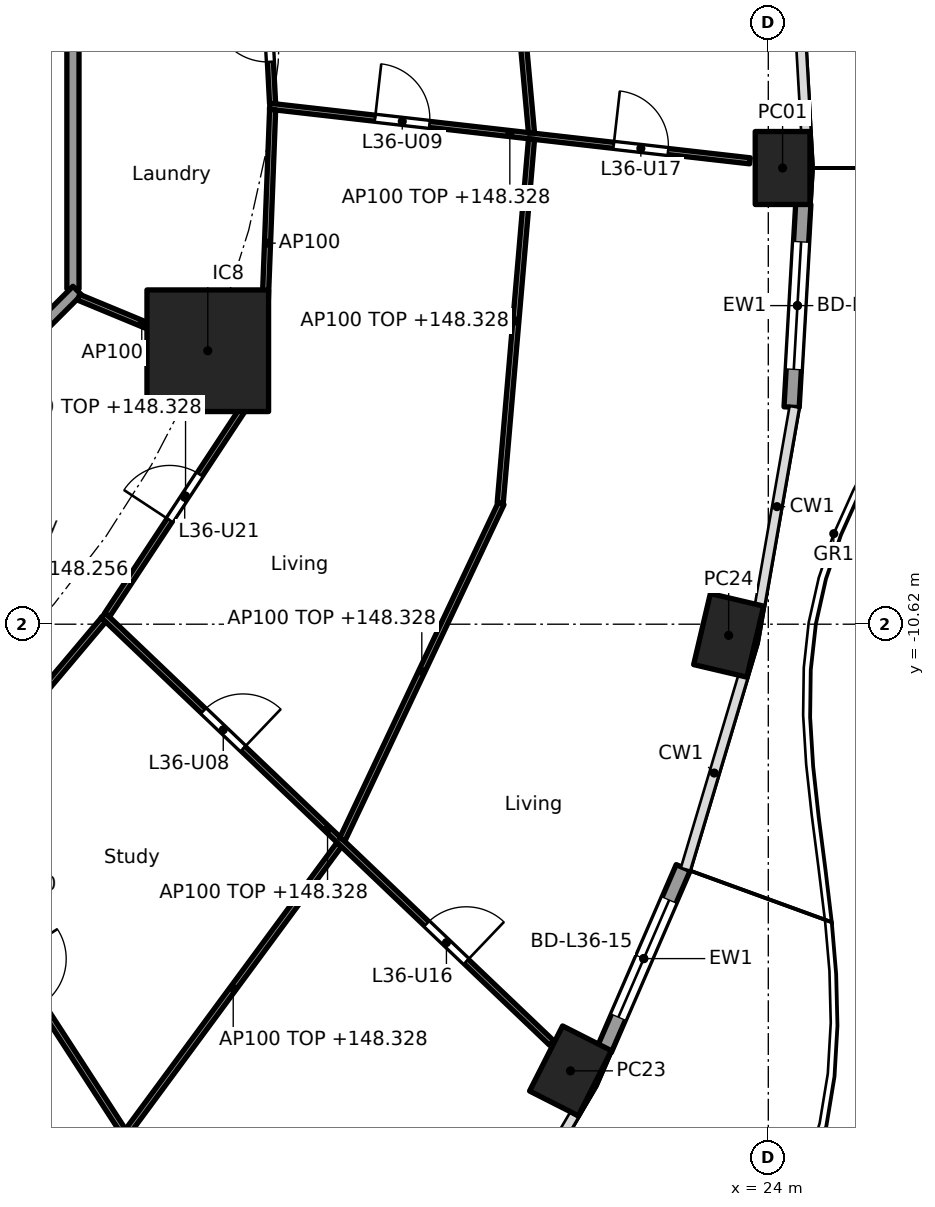
"""IFC4 building model, lengths in metres.
Left out: names, types, materials, properties, quantities, classifications, styles, units other than length and angle.
Written with IfcOpenShell. Run it as: python <this file> out.ifc"""

import sys

from ifc_helpers import new_model, si_unit, direction, frame, frame_2d, origin, origin_2d, place, context, subcontext, project, spatial, rectangle, hollow_rectangle, extrude, element, fill, save


model = new_model("IFC4")
c1 = context("Model", 3, precision=1e-05, world=origin(), true_north=direction((0.0, 1.0)))
c2 = subcontext(c1, "Body", "Model", "MODEL_VIEW")
j1 = project(units=[si_unit("LENGTHUNIT", "METRE"), si_unit("PLANEANGLEUNIT", "RADIAN")], contexts=[c1])
p1 = place(None, origin())
s1 = spatial("IfcSite", under=j1, at=p1, CompositionType="ELEMENT")
p2 = place(p1, origin())
s2 = spatial("IfcBuilding", under=s1, at=p2, CompositionType="ELEMENT")
p3 = place(p2, frame((0.0, 0.0, 145.5)))
s3 = spatial("IfcBuildingStorey", under=s2, at=p3, CompositionType="ELEMENT", Elevation=145.5)
for number, where, z_axis, x_axis in (
    (1, (24.235, -3.118, 0.0), (0.0, 0.0, 1.0), (0.0, 1.0, 0.0)),
    (2, (20.747, -17.965, 0.0), (0.0, 0.0, 1.0), (0.452, 0.892, 0.0)),
    (3, (23.348, -10.803, 0.0), (0.0, 0.0, 1.0), (0.229, 0.973, 0.0)),
):
    element("IfcColumn", number, at=place(p3, frame(where, z_axis=z_axis, x_axis=x_axis)), inside=s3, PredefinedType="COLUMN", context=c2, shape_type="SweptSolid", body=[
        extrude(hollow_rectangle(XDim=1.2, YDim=0.9, WallThickness=0.04, at=origin_2d()), origin(), (0.0, 0.0, 1.0), 3.7),
    ])
p4 = place(p3, frame((14.782, -6.123, 0.0), z_axis=(0.0, 0.0, 1.0), x_axis=(1.0, 0.0, 0.0)))
e4 = element("IfcColumn", 4, at=p4, inside=s3, PredefinedType="COLUMN", context=c2, shape_type="SweptSolid", body=[
    extrude(rectangle(XDim=2.0, YDim=2.0, at=origin_2d()), origin(), (0.0, 0.0, 1.0), 3.7),
])
p5 = place(p3, frame((22.6, -14.623, 0.0), z_axis=(0.0, 0.0, 1.0), x_axis=(-0.397575919276, -0.917569282622, 0.0)))
e5 = element("IfcWall", 5, at=p5, inside=s3, PredefinedType="SOLIDWALL", context=c2, shape_type="SweptSolid", body=[
    extrude(rectangle(XDim=3.261, YDim=0.25, at=frame_2d((1.63, 0.0))), origin(), (0.0, 0.0, 1.0), 3.44),
])
p6 = place(p5, frame((0.58, 0.0, 0.0)))
e6 = element("IfcOpeningElement", 6, at=p6, cuts=e5, PredefinedType="OPENING", context=c2, shape_type="SweptSolid", body=[
    extrude(rectangle(XDim=2.1, YDim=2.4, at=frame_2d((1.05, 1.2))), frame((0.0, 0.135, 0.0), z_axis=(0.0, -1.0, 0.0), x_axis=(1.0, 0.0, 0.0)), (0.0, 0.0, 1.0), 0.27),
])
p7 = place(p3, frame((24.576, -3.709, 0.0), z_axis=(0.0, 0.0, 1.0), x_axis=(-0.05746514539, -0.998347513176, 0.0)))
e7 = element("IfcWall", 7, at=p7, inside=s3, PredefinedType="SOLIDWALL", context=c2, shape_type="SweptSolid", body=[
    extrude(rectangle(XDim=3.348, YDim=0.25, at=frame_2d((1.674, 0.0))), origin(), (0.0, 0.0, 1.0), 3.44),
])
p8 = place(p7, frame((0.624, 0.0, 0.0)))
e8 = element("IfcOpeningElement", 8, at=p8, cuts=e7, PredefinedType="OPENING", context=c2, shape_type="SweptSolid", body=[
    extrude(rectangle(XDim=2.1, YDim=2.4, at=frame_2d((1.05, 1.2))), frame((0.0, 0.135, 0.0), z_axis=(0.0, -1.0, 0.0), x_axis=(1.0, 0.0, 0.0)), (0.0, 0.0, 1.0), 0.27),
])
p9 = place(p3, frame((12.565, -5.104, 0.0), z_axis=(0.0, 0.0, 1.0), x_axis=(0.0, 1.0, 0.0)))
e9 = element("IfcWall", 9, at=p9, inside=s3, PredefinedType="PARTITIONING", context=c2, shape_type="SweptSolid", body=[
    extrude(rectangle(XDim=10.209, YDim=0.2, at=frame_2d((5.104, 0.0))), origin(), (0.0, 0.0, 1.0), 3.44),
])
p10 = place(p3, frame((5.275, -12.494, 0.0), z_axis=(0.0, 0.0, 1.0), x_axis=(0.707106781187, 0.707106781187, 0.0)))
e10 = element("IfcWall", 10, at=p10, inside=s3, PredefinedType="PARTITIONING", context=c2, shape_type="SweptSolid", body=[
    extrude(rectangle(XDim=10.409, YDim=0.2, at=frame_2d((5.205, 0.0))), origin(), (0.0, 0.0, 1.0), 3.44),
])
p11 = place(p3, frame((15.801, -2.103, 0.0), z_axis=(0.0, 0.0, 1.0), x_axis=(0.993607212763, -0.112892456544, 0.0)))
e11 = element("IfcWall", 11, at=p11, inside=s3, PredefinedType="PARTITIONING", context=c2, shape_type="SweptSolid", body=[
    extrude(rectangle(XDim=7.948, YDim=0.1, at=frame_2d((3.974, 0.0))), origin(), (0.0, 0.0, 1.0), 2.828),
])
p12 = place(p11, frame((1.743, 0.0, 0.0)))
e12 = element("IfcOpeningElement", 12, at=p12, cuts=e11, PredefinedType="OPENING", context=c2, shape_type="SweptSolid", body=[
    extrude(rectangle(XDim=0.9, YDim=2.1, at=frame_2d((0.45, 1.05))), frame((0.0, 0.06, 0.0), z_axis=(0.0, -1.0, 0.0), x_axis=(1.0, 0.0, 0.0)), (0.0, 0.0, 1.0), 0.12),
])
p13 = place(p11, frame((5.692, 0.0, 0.0)))
e13 = element("IfcOpeningElement", 13, at=p13, cuts=e11, PredefinedType="OPENING", context=c2, shape_type="SweptSolid", body=[
    extrude(rectangle(XDim=0.9, YDim=2.1, at=frame_2d((0.45, 1.05))), frame((0.0, 0.06, 0.0), z_axis=(0.0, -1.0, 0.0), x_axis=(1.0, 0.0, 0.0)), (0.0, 0.0, 1.0), 0.12),
])
p14 = place(p3, frame((15.848, -2.058, 0.0), z_axis=(0.0, 0.0, 1.0), x_axis=(-0.052509224895, 0.998620439056, 0.0)))
e14 = element("IfcWall", 14, at=p14, inside=s3, PredefinedType="PARTITIONING", context=c2, shape_type="SweptSolid", body=[
    extrude(rectangle(XDim=4.649, YDim=0.1, at=frame_2d((2.325, 0.0))), origin(), (0.0, 0.0, 1.0), 2.828),
])
p15 = place(p14, frame((0.687, 0.0, 0.0)))
e15 = element("IfcOpeningElement", 15, at=p15, cuts=e14, PredefinedType="OPENING", context=c2, shape_type="SweptSolid", body=[
    extrude(rectangle(XDim=0.9, YDim=2.1, at=frame_2d((0.45, 1.05))), frame((0.0, 0.06, 0.0), z_axis=(0.0, -1.0, 0.0), x_axis=(1.0, 0.0, 0.0)), (0.0, 0.0, 1.0), 0.12),
])
p16 = place(p3, frame((15.849, -2.158, 0.0), z_axis=(0.0, 0.0, 1.0), x_axis=(-0.038390448414, -0.999262815014, 0.0)))
e16 = element("IfcWall", 16, at=p16, inside=s3, PredefinedType="PARTITIONING", context=c2, shape_type="SweptSolid", body=[
    extrude(rectangle(XDim=4.394, YDim=0.1, at=frame_2d((2.197, 0.0))), origin(), (0.0, 0.0, 1.0), 3.44),
])
p17 = place(p3, frame((20.106, -2.542, 0.0), z_axis=(0.0, 0.0, 1.0), x_axis=(-0.090567755363, 0.995890296011, 0.0)))
e17 = element("IfcWall", 17, at=p17, inside=s3, PredefinedType="PARTITIONING", context=c2, shape_type="SweptSolid", body=[
    extrude(rectangle(XDim=6.189, YDim=0.1, at=frame_2d((3.095, 0.0))), origin(), (0.0, 0.0, 1.0), 2.828),
])
p18 = place(p3, frame((20.106, -2.642, 0.0), z_axis=(0.0, 0.0, 1.0), x_axis=(-0.085672025822, -0.996323393277, 0.0)))
e18 = element("IfcWall", 18, at=p18, inside=s3, PredefinedType="PARTITIONING", context=c2, shape_type="SweptSolid", body=[
    extrude(rectangle(XDim=6.007, YDim=0.1, at=frame_2d((3.003, 0.0))), origin(), (0.0, 0.0, 1.0), 2.828),
])
p19 = place(p3, frame((10.143, -13.946, 0.0), z_axis=(0.0, 0.0, 1.0), x_axis=(0.543872968754, -0.839167560061, 0.0)))
e19 = element("IfcWall", 19, at=p19, inside=s3, PredefinedType="PARTITIONING", context=c2, shape_type="SweptSolid", body=[
    extrude(rectangle(XDim=6.088, YDim=0.1, at=frame_2d((3.044, 0.0))), origin(), (0.0, 0.0, 1.0), 3.44),
])
p20 = place(p19, frame((2.594, 0.0, 0.0)))
e20 = element("IfcOpeningElement", 20, at=p20, cuts=e19, PredefinedType="OPENING", context=c2, shape_type="SweptSolid", body=[
    extrude(rectangle(XDim=0.9, YDim=2.1, at=frame_2d((0.45, 1.05))), frame((0.0, 0.06, 0.0), z_axis=(0.0, -1.0, 0.0), x_axis=(1.0, 0.0, 0.0)), (0.0, 0.0, 1.0), 0.12),
])
p21 = place(p3, frame((10.202, -13.95, 0.0), z_axis=(0.0, 0.0, 1.0), x_axis=(0.644068144287, 0.764968120587, 0.0)))
e21 = element("IfcWall", 21, at=p21, inside=s3, PredefinedType="PARTITIONING", context=c2, shape_type="SweptSolid", body=[
    extrude(rectangle(XDim=4.449, YDim=0.1, at=frame_2d((2.224, 0.0))), origin(), (0.0, 0.0, 1.0), 2.828),
])
p22 = place(p3, frame((13.457, -18.973, 0.0), z_axis=(0.0, 0.0, 1.0), x_axis=(0.593532053206, 0.80481035146, 0.0)))
e22 = element("IfcWall", 22, at=p22, inside=s3, PredefinedType="PARTITIONING", context=c2, shape_type="SweptSolid", body=[
    extrude(rectangle(XDim=5.876, YDim=0.1, at=frame_2d((2.938, 0.0))), origin(), (0.0, 0.0, 1.0), 2.828),
])
p23 = place(p3, frame((13.064, -10.474, 0.0), z_axis=(0.0, 0.0, 1.0), x_axis=(0.723627371706, -0.690190862673, 0.0)))
e23 = element("IfcWall", 23, at=p23, inside=s3, PredefinedType="PARTITIONING", context=c2, shape_type="SweptSolid", body=[
    extrude(rectangle(XDim=10.193, YDim=0.1, at=frame_2d((5.097, 0.0))), origin(), (0.0, 0.0, 1.0), 2.828),
])
p24 = place(p23, frame((2.277, 0.0, 0.0)))
e24 = element("IfcOpeningElement", 24, at=p24, cuts=e23, PredefinedType="OPENING", context=c2, shape_type="SweptSolid", body=[
    extrude(rectangle(XDim=0.9, YDim=2.1, at=frame_2d((0.45, 1.05))), frame((0.0, 0.06, 0.0), z_axis=(0.0, -1.0, 0.0), x_axis=(1.0, 0.0, 0.0)), (0.0, 0.0, 1.0), 0.12),
])
p25 = place(p23, frame((7.348, 0.0, 0.0)))
e25 = element("IfcOpeningElement", 25, at=p25, cuts=e23, PredefinedType="OPENING", context=c2, shape_type="SweptSolid", body=[
    extrude(rectangle(XDim=0.9, YDim=2.1, at=frame_2d((0.45, 1.05))), frame((0.0, 0.06, 0.0), z_axis=(0.0, -1.0, 0.0), x_axis=(1.0, 0.0, 0.0)), (0.0, 0.0, 1.0), 0.12),
])
p26 = place(p3, frame((13.127, -10.467, 0.0), z_axis=(0.0, 0.0, 1.0), x_axis=(0.550614843759, 0.834759422727, 0.0)))
e26 = element("IfcWall", 26, at=p26, inside=s3, PredefinedType="PARTITIONING", context=c2, shape_type="SweptSolid", body=[
    extrude(rectangle(XDim=4.683, YDim=0.1, at=frame_2d((2.341, 0.0))), origin(), (0.0, 0.0, 1.0), 2.828),
])
p27 = place(p26, frame((1.866, 0.0, 0.0)))
e27 = element("IfcOpeningElement", 27, at=p27, cuts=e26, PredefinedType="OPENING", context=c2, shape_type="SweptSolid", body=[
    extrude(rectangle(XDim=0.9, YDim=2.1, at=frame_2d((0.45, 1.05))), frame((0.0, 0.06, 0.0), z_axis=(0.0, -1.0, 0.0), x_axis=(1.0, 0.0, 0.0)), (0.0, 0.0, 1.0), 0.12),
])
p28 = place(p3, frame((16.995, -14.158, 0.0), z_axis=(0.0, 0.0, 1.0), x_axis=(0.427456178439, 0.904036069808, 0.0)))
e28 = element("IfcWall", 28, at=p28, inside=s3, PredefinedType="PARTITIONING", context=c2, shape_type="SweptSolid", body=[
    extrude(rectangle(XDim=6.113, YDim=0.1, at=frame_2d((3.057, 0.0))), origin(), (0.0, 0.0, 1.0), 2.828),
])
p29 = place(p3, frame((12.657, -5.243, 0.0), z_axis=(0.0, 0.0, 1.0), x_axis=(0.923864733477, -0.382719158442, 0.0)))
e29 = element("IfcWall", 29, at=p29, inside=s3, PredefinedType="PARTITIONING", context=c2, shape_type="SweptSolid", body=[
    extrude(rectangle(XDim=2.25, YDim=0.1, at=frame_2d((1.125, 0.0))), origin(), (0.0, 0.0, 1.0), 3.44),
])
p30 = place(p6, origin())
e30 = element("IfcDoor", 30, at=p30, inside=s3, OperationType="SLIDING_TO_LEFT", PredefinedType="DOOR", context=c2, shape_type="SweptSolid", body=[
    extrude(rectangle(XDim=2.1, YDim=2.4, at=frame_2d((1.05, 1.2))), frame((0.0, 0.025, 0.0), z_axis=(0.0, -1.0, 0.0), x_axis=(1.0, 0.0, 0.0)), (0.0, 0.0, 1.0), 0.05),
])
fill(e6, e30)
p31 = place(p8, origin())
e31 = element("IfcDoor", 31, at=p31, inside=s3, OperationType="SLIDING_TO_LEFT", PredefinedType="DOOR", context=c2, shape_type="SweptSolid", body=[
    extrude(rectangle(XDim=2.1, YDim=2.4, at=frame_2d((1.05, 1.2))), frame((0.0, 0.025, 0.0), z_axis=(0.0, -1.0, 0.0), x_axis=(1.0, 0.0, 0.0)), (0.0, 0.0, 1.0), 0.05),
])
fill(e8, e31)
p32 = place(p24, origin())
e32 = element("IfcDoor", 32, at=p32, inside=s3, OperationType="SINGLE_SWING_RIGHT", PredefinedType="DOOR", context=c2, shape_type="SweptSolid", body=[
    extrude(rectangle(XDim=0.9, YDim=2.1, at=frame_2d((0.45, 1.05))), frame((0.0, 0.025, 0.0), z_axis=(0.0, -1.0, 0.0), x_axis=(1.0, 0.0, 0.0)), (0.0, 0.0, 1.0), 0.05),
])
fill(e24, e32)
p33 = place(p12, origin())
e33 = element("IfcDoor", 33, at=p33, inside=s3, OperationType="SINGLE_SWING_LEFT", PredefinedType="DOOR", context=c2, shape_type="SweptSolid", body=[
    extrude(rectangle(XDim=0.9, YDim=2.1, at=frame_2d((0.45, 1.05))), frame((0.0, 0.025, 0.0), z_axis=(0.0, -1.0, 0.0), x_axis=(1.0, 0.0, 0.0)), (0.0, 0.0, 1.0), 0.05),
])
fill(e12, e33)
p34 = place(p25, origin())
e34 = element("IfcDoor", 34, at=p34, inside=s3, OperationType="SINGLE_SWING_RIGHT", PredefinedType="DOOR", context=c2, shape_type="SweptSolid", body=[
    extrude(rectangle(XDim=0.9, YDim=2.1, at=frame_2d((0.45, 1.05))), frame((0.0, 0.025, 0.0), z_axis=(0.0, -1.0, 0.0), x_axis=(1.0, 0.0, 0.0)), (0.0, 0.0, 1.0), 0.05),
])
fill(e25, e34)
p35 = place(p13, origin())
e35 = element("IfcDoor", 35, at=p35, inside=s3, OperationType="SINGLE_SWING_LEFT", PredefinedType="DOOR", context=c2, shape_type="SweptSolid", body=[
    extrude(rectangle(XDim=0.9, YDim=2.1, at=frame_2d((0.45, 1.05))), frame((0.0, 0.025, 0.0), z_axis=(0.0, -1.0, 0.0), x_axis=(1.0, 0.0, 0.0)), (0.0, 0.0, 1.0), 0.05),
])
fill(e13, e35)
p36 = place(p27, origin())
e36 = element("IfcDoor", 36, at=p36, inside=s3, OperationType="SINGLE_SWING_LEFT", PredefinedType="DOOR", context=c2, shape_type="SweptSolid", body=[
    extrude(rectangle(XDim=0.9, YDim=2.1, at=frame_2d((0.45, 1.05))), frame((0.0, 0.025, 0.0), z_axis=(0.0, -1.0, 0.0), x_axis=(1.0, 0.0, 0.0)), (0.0, 0.0, 1.0), 0.05),
])
fill(e27, e36)
p37 = place(p15, origin())
e37 = element("IfcDoor", 37, at=p37, inside=s3, OperationType="SINGLE_SWING_RIGHT", PredefinedType="DOOR", context=c2, shape_type="SweptSolid", body=[
    extrude(rectangle(XDim=0.9, YDim=2.1, at=frame_2d((0.45, 1.05))), frame((0.0, 0.025, 0.0), z_axis=(0.0, -1.0, 0.0), x_axis=(1.0, 0.0, 0.0)), (0.0, 0.0, 1.0), 0.05),
])
fill(e15, e37)
save(model, sys.argv[1])
